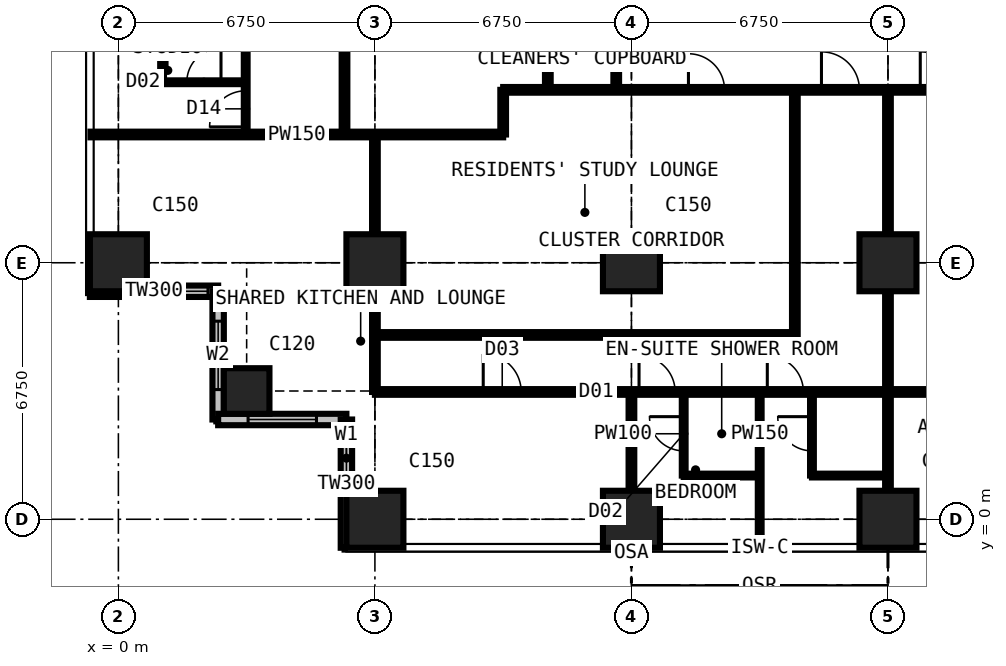
"""IFC4 building model, lengths in metres.
Left out: names, types, materials, properties, quantities, classifications, styles, units other than length and angle.
Written with IfcOpenShell. Run it as: python <this file> out.ifc"""

import sys

from ifc_helpers import new_model, si_unit, direction, frame, frame_2d, origin, origin_2d, place, context, subcontext, project, spatial, rectangle, extrude, element, fill, save


model = new_model("IFC4")
c1 = context("Model", 3, precision=1e-05, world=origin(), true_north=direction((0.0, 1.0)))
c2 = subcontext(c1, "Body", "Model", "MODEL_VIEW")
j1 = project(units=[si_unit("LENGTHUNIT", "METRE"), si_unit("PLANEANGLEUNIT", "RADIAN")], contexts=[c1])
p1 = place(None, origin())
s1 = spatial("IfcSite", under=j1, at=p1, CompositionType="ELEMENT")
p2 = place(p1, origin())
s2 = spatial("IfcBuilding", under=s1, at=p2, CompositionType="ELEMENT")
p3 = place(p2, frame((0.0, 0.0, 167.4)))
s3 = spatial("IfcBuildingStorey", under=s2, at=p3, CompositionType="ELEMENT", Elevation=167.4)
p4 = place(p3, frame((0.0, 6.75, 0.0), z_axis=(0.0, 0.0, 1.0), x_axis=(1.0, 0.0, 0.0)))
e1 = element("IfcColumn", 1, at=p4, inside=s3, PredefinedType="COLUMN", context=c2, shape_type="SweptSolid", body=[
    extrude(rectangle(XDim=1.5, YDim=1.5, at=origin_2d()), origin(), (0.0, 0.0, 1.0), 3.6),
])
p5 = place(p3, frame((3.375, 3.375, 0.0), z_axis=(0.0, 0.0, 1.0), x_axis=(1.0, 0.0, 0.0)))
e2 = element("IfcColumn", 2, at=p5, inside=s3, PredefinedType="COLUMN", context=c2, shape_type="SweptSolid", body=[
    extrude(rectangle(XDim=1.2, YDim=1.2, at=origin_2d()), origin(), (0.0, 0.0, 1.0), 3.6),
])
for number, where, z_axis, x_axis in (
    (3, (6.75, 0.0, 0.0), (0.0, 0.0, 1.0), (1.0, 0.0, 0.0)),
    (4, (6.75, 6.75, 0.0), (0.0, 0.0, 1.0), (1.0, 0.0, 0.0)),
    (5, (13.5, 0.0, 0.0), (0.0, 0.0, 1.0), (1.0, 0.0, 0.0)),
    (6, (13.5, 6.75, 0.0), (0.0, 0.0, 1.0), (1.0, 0.0, 0.0)),
    (7, (20.25, 0.0, 0.0), (0.0, 0.0, 1.0), (1.0, 0.0, 0.0)),
    (8, (20.25, 6.75, 0.0), (0.0, 0.0, 1.0), (1.0, 0.0, 0.0)),
):
    element("IfcColumn", number, at=place(p3, frame(where, z_axis=z_axis, x_axis=x_axis)), inside=s3, PredefinedType="COLUMN", context=c2, shape_type="SweptSolid", body=[
        extrude(rectangle(XDim=1.5, YDim=1.5, at=origin_2d()), origin(), (0.0, 0.0, 1.0), 3.6),
    ])
p6 = place(p3, frame((-0.75, 6.0, 0.0), z_axis=(0.0, 0.0, 1.0), x_axis=(1.0, 0.0, 0.0)))
e9 = element("IfcWall", 9, at=p6, inside=s3, PredefinedType="SOLIDWALL", context=c2, shape_type="SweptSolid", body=[
    extrude(rectangle(XDim=3.375, YDim=0.3, at=frame_2d((1.688, 0.0))), origin(), (0.0, 0.0, 1.0), 3.375),
])
p7 = place(p6, frame((1.607, 0.0, 0.9)))
e10 = element("IfcOpeningElement", 10, at=p7, cuts=e9, PredefinedType="OPENING", context=c2, shape_type="SweptSolid", body=[
    extrude(rectangle(XDim=1.5, YDim=1.8, at=frame_2d((0.75, 0.9))), frame((0.0, 0.16, 0.0), z_axis=(0.0, -1.0, 0.0), x_axis=(1.0, 0.0, 0.0)), (0.0, 0.0, 1.0), 0.32),
])
p8 = place(p3, frame((2.625, 6.0, 0.0), z_axis=(0.0, 0.0, 1.0), x_axis=(0.0, -1.0, 0.0)))
e11 = element("IfcWall", 11, at=p8, inside=s3, PredefinedType="SOLIDWALL", context=c2, shape_type="SweptSolid", body=[
    extrude(rectangle(XDim=3.375, YDim=0.3, at=frame_2d((1.688, 0.0))), origin(), (0.0, 0.0, 1.0), 3.375),
])
p9 = place(p8, frame((0.788, 0.0, 0.6)))
e12 = element("IfcOpeningElement", 12, at=p9, cuts=e11, PredefinedType="OPENING", context=c2, shape_type="SweptSolid", body=[
    extrude(rectangle(XDim=1.8, YDim=2.1, at=frame_2d((0.9, 1.05))), frame((0.0, 0.16, 0.0), z_axis=(0.0, -1.0, 0.0), x_axis=(1.0, 0.0, 0.0)), (0.0, 0.0, 1.0), 0.32),
])
p10 = place(p3, frame((2.625, 2.625, 0.0), z_axis=(0.0, 0.0, 1.0), x_axis=(1.0, 0.0, 0.0)))
e13 = element("IfcWall", 13, at=p10, inside=s3, PredefinedType="SOLIDWALL", context=c2, shape_type="SweptSolid", body=[
    extrude(rectangle(XDim=3.375, YDim=0.3, at=frame_2d((1.688, 0.0))), origin(), (0.0, 0.0, 1.0), 3.375),
])
p11 = place(p10, frame((0.788, 0.0, 0.6)))
e14 = element("IfcOpeningElement", 14, at=p11, cuts=e13, PredefinedType="OPENING", context=c2, shape_type="SweptSolid", body=[
    extrude(rectangle(XDim=1.8, YDim=2.1, at=frame_2d((0.9, 1.05))), frame((0.0, 0.16, 0.0), z_axis=(0.0, -1.0, 0.0), x_axis=(1.0, 0.0, 0.0)), (0.0, 0.0, 1.0), 0.32),
])
p12 = place(p3, frame((6.0, 2.625, 0.0), z_axis=(0.0, 0.0, 1.0), x_axis=(0.0, -1.0, 0.0)))
e15 = element("IfcWall", 15, at=p12, inside=s3, PredefinedType="SOLIDWALL", context=c2, shape_type="SweptSolid", body=[
    extrude(rectangle(XDim=3.375, YDim=0.3, at=frame_2d((1.688, 0.0))), origin(), (0.0, 0.0, 1.0), 3.375),
])
p13 = place(p12, frame((0.268, 0.0, 0.9)))
e16 = element("IfcOpeningElement", 16, at=p13, cuts=e15, PredefinedType="OPENING", context=c2, shape_type="SweptSolid", body=[
    extrude(rectangle(XDim=1.5, YDim=1.8, at=frame_2d((0.75, 0.9))), frame((0.0, 0.16, 0.0), z_axis=(0.0, -1.0, 0.0), x_axis=(1.0, 0.0, 0.0)), (0.0, 0.0, 1.0), 0.32),
])
p14 = place(p3, frame((-0.734, 10.125, 0.0), z_axis=(0.0, 0.0, 1.0), x_axis=(1.0, 0.0, 0.0)))
e17 = element("IfcWall", 17, at=p14, inside=s3, PredefinedType="PARTITIONING", context=c2, shape_type="SweptSolid", body=[
    extrude(rectangle(XDim=10.859, YDim=0.15, at=frame_2d((5.429, 0.0))), origin(), (0.0, 0.0, 1.0), 3.375),
])
p15 = place(p3, frame((1.15, 11.5, 0.0), z_axis=(0.0, 0.0, 1.0), x_axis=(0.0, 1.0, 0.0)))
e18 = element("IfcWall", 18, at=p15, inside=s3, PredefinedType="PARTITIONING", context=c2, shape_type="SweptSolid", body=[
    extrude(rectangle(XDim=2.0, YDim=0.1, at=frame_2d((1.0, 0.0))), origin(), (0.0, 0.0, 1.0), 3.375),
])
p16 = place(p3, frame((1.15, 11.5, 0.0), z_axis=(0.0, 0.0, 1.0), x_axis=(1.0, 0.0, 0.0)))
e19 = element("IfcWall", 19, at=p16, inside=s3, PredefinedType="PARTITIONING", context=c2, shape_type="SweptSolid", body=[
    extrude(rectangle(XDim=2.2, YDim=0.1, at=frame_2d((1.1, 0.0))), origin(), (0.0, 0.0, 1.0), 3.375),
])
p17 = place(p16, frame((0.65, 0.0, 0.0)))
e20 = element("IfcOpeningElement", 20, at=p17, cuts=e19, PredefinedType="OPENING", context=c2, shape_type="SweptSolid", body=[
    extrude(rectangle(XDim=0.9, YDim=2.2, at=frame_2d((0.45, 1.1))), frame((0.0, 0.06, 0.0), z_axis=(0.0, -1.0, 0.0), x_axis=(1.0, 0.0, 0.0)), (0.0, 0.0, 1.0), 0.12),
])
p18 = place(p3, frame((3.35, 10.125, 0.0), z_axis=(0.0, 0.0, 1.0), x_axis=(0.0, 1.0, 0.0)))
e21 = element("IfcWall", 21, at=p18, inside=s3, PredefinedType="PARTITIONING", context=c2, shape_type="SweptSolid", body=[
    extrude(rectangle(XDim=16.875, YDim=0.1, at=frame_2d((8.438, 0.0))), origin(), (0.0, 0.0, 1.0), 3.375),
])
p19 = place(p18, frame((0.2, 0.0, 0.0)))
e22 = element("IfcOpeningElement", 22, at=p19, cuts=e21, PredefinedType="OPENING", context=c2, shape_type="SweptSolid", body=[
    extrude(rectangle(XDim=0.95, YDim=2.2, at=frame_2d((0.475, 1.1))), frame((0.0, 0.06, 0.0), z_axis=(0.0, -1.0, 0.0), x_axis=(1.0, 0.0, 0.0)), (0.0, 0.0, 1.0), 0.12),
])
p20 = place(p18, frame((3.575, 0.0, 0.0)))
e23 = element("IfcOpeningElement", 23, at=p20, cuts=e21, PredefinedType="OPENING", context=c2, shape_type="SweptSolid", body=[
    extrude(rectangle(XDim=0.95, YDim=2.2, at=frame_2d((0.475, 1.1))), frame((0.0, 0.06, 0.0), z_axis=(0.0, -1.0, 0.0), x_axis=(1.0, 0.0, 0.0)), (0.0, 0.0, 1.0), 0.12),
])
p21 = place(p18, frame((6.95, 0.0, 0.0)))
e24 = element("IfcOpeningElement", 24, at=p21, cuts=e21, PredefinedType="OPENING", context=c2, shape_type="SweptSolid", body=[
    extrude(rectangle(XDim=0.95, YDim=2.2, at=frame_2d((0.475, 1.1))), frame((0.0, 0.06, 0.0), z_axis=(0.0, -1.0, 0.0), x_axis=(1.0, 0.0, 0.0)), (0.0, 0.0, 1.0), 0.12),
])
p22 = place(p3, frame((5.95, 10.125, 0.0), z_axis=(0.0, 0.0, 1.0), x_axis=(0.0, 1.0, 0.0)))
e25 = element("IfcWall", 25, at=p22, inside=s3, PredefinedType="PARTITIONING", context=c2, shape_type="SweptSolid", body=[
    extrude(rectangle(XDim=2.65, YDim=0.15, at=frame_2d((1.325, 0.0))), origin(), (0.0, 0.0, 1.0), 3.375),
])
p23 = place(p3, frame((6.75, 3.35, 0.0), z_axis=(0.0, 0.0, 1.0), x_axis=(0.0, 1.0, 0.0)))
e26 = element("IfcWall", 26, at=p23, inside=s3, PredefinedType="PARTITIONING", context=c2, shape_type="SweptSolid", body=[
    extrude(rectangle(XDim=6.775, YDim=0.15, at=frame_2d((3.387, 0.0))), origin(), (0.0, 0.0, 1.0), 2.877),
])
p24 = place(p3, frame((6.75, 3.35, 0.0), z_axis=(0.0, 0.0, 1.0), x_axis=(1.0, 0.0, 0.0)))
e27 = element("IfcWall", 27, at=p24, inside=s3, PredefinedType="PARTITIONING", context=c2, shape_type="SweptSolid", body=[
    extrude(rectangle(XDim=20.25, YDim=0.15, at=frame_2d((10.125, 0.0))), origin(), (0.0, 0.0, 1.0), 3.375),
])
p25 = place(p24, frame((2.85, 0.0, 0.0)))
e28 = element("IfcOpeningElement", 28, at=p25, cuts=e27, PredefinedType="OPENING", context=c2, shape_type="SweptSolid", body=[
    extrude(rectangle(XDim=1.0, YDim=2.2, at=frame_2d((0.5, 1.1))), frame((0.0, 0.085, 0.0), z_axis=(0.0, -1.0, 0.0), x_axis=(1.0, 0.0, 0.0)), (0.0, 0.0, 1.0), 0.17),
])
p26 = place(p24, frame((6.95, 0.0, 0.0)))
e29 = element("IfcOpeningElement", 29, at=p26, cuts=e27, PredefinedType="OPENING", context=c2, shape_type="SweptSolid", body=[
    extrude(rectangle(XDim=0.95, YDim=2.2, at=frame_2d((0.475, 1.1))), frame((0.0, 0.085, 0.0), z_axis=(0.0, -1.0, 0.0), x_axis=(1.0, 0.0, 0.0)), (0.0, 0.0, 1.0), 0.17),
])
p27 = place(p24, frame((10.325, 0.0, 0.0)))
e30 = element("IfcOpeningElement", 30, at=p27, cuts=e27, PredefinedType="OPENING", context=c2, shape_type="SweptSolid", body=[
    extrude(rectangle(XDim=0.95, YDim=2.2, at=frame_2d((0.475, 1.1))), frame((0.0, 0.085, 0.0), z_axis=(0.0, -1.0, 0.0), x_axis=(1.0, 0.0, 0.0)), (0.0, 0.0, 1.0), 0.17),
])
p28 = place(p24, frame((15.1, 0.0, 0.0)))
e31 = element("IfcOpeningElement", 31, at=p28, cuts=e27, PredefinedType="OPENING", context=c2, shape_type="SweptSolid", body=[
    extrude(rectangle(XDim=0.95, YDim=2.2, at=frame_2d((0.475, 1.1))), frame((0.0, 0.085, 0.0), z_axis=(0.0, -1.0, 0.0), x_axis=(1.0, 0.0, 0.0)), (0.0, 0.0, 1.0), 0.17),
])
p29 = place(p3, frame((6.75, 4.85, 0.0), z_axis=(0.0, 0.0, 1.0), x_axis=(1.0, 0.0, 0.0)))
e32 = element("IfcWall", 32, at=p29, inside=s3, PredefinedType="PARTITIONING", context=c2, shape_type="SweptSolid", body=[
    extrude(rectangle(XDim=11.05, YDim=0.15, at=frame_2d((5.525, 0.0))), origin(), (0.0, 0.0, 1.0), 3.375),
])
p30 = place(p3, frame((10.125, 10.125, 0.0), z_axis=(0.0, 0.0, 1.0), x_axis=(0.0, 1.0, 0.0)))
e33 = element("IfcWall", 33, at=p30, inside=s3, PredefinedType="PARTITIONING", context=c2, shape_type="SweptSolid", body=[
    extrude(rectangle(XDim=1.175, YDim=0.15, at=frame_2d((0.587, 0.0))), origin(), (0.0, 0.0, 1.0), 3.375),
])
p31 = place(p3, frame((10.125, 11.3, 0.0), z_axis=(0.0, 0.0, 1.0), x_axis=(1.0, 0.0, 0.0)))
e34 = element("IfcWall", 34, at=p31, inside=s3, PredefinedType="PARTITIONING", context=c2, shape_type="SweptSolid", body=[
    extrude(rectangle(XDim=20.25, YDim=0.15, at=frame_2d((10.125, 0.0))), origin(), (0.0, 0.0, 1.0), 3.375),
])
p32 = place(p31, frame((8.375, 0.0, 0.0)))
e35 = element("IfcOpeningElement", 35, at=p32, cuts=e34, PredefinedType="OPENING", context=c2, shape_type="SweptSolid", body=[
    extrude(rectangle(XDim=1.0, YDim=2.2, at=frame_2d((0.5, 1.1))), frame((0.0, 0.085, 0.0), z_axis=(0.0, -1.0, 0.0), x_axis=(1.0, 0.0, 0.0)), (0.0, 0.0, 1.0), 0.17),
])
p33 = place(p31, frame((10.975, 0.0, 0.0)))
e36 = element("IfcOpeningElement", 36, at=p33, cuts=e34, PredefinedType="OPENING", context=c2, shape_type="SweptSolid", body=[
    extrude(rectangle(XDim=1.0, YDim=2.2, at=frame_2d((0.5, 1.1))), frame((0.0, 0.085, 0.0), z_axis=(0.0, -1.0, 0.0), x_axis=(1.0, 0.0, 0.0)), (0.0, 0.0, 1.0), 0.17),
])
p34 = place(p31, frame((4.875, 0.0, 0.0)))
e37 = element("IfcOpeningElement", 37, at=p34, cuts=e34, PredefinedType="OPENING", context=c2, shape_type="SweptSolid", body=[
    extrude(rectangle(XDim=0.95, YDim=2.2, at=frame_2d((0.475, 1.1))), frame((0.0, 0.085, 0.0), z_axis=(0.0, -1.0, 0.0), x_axis=(1.0, 0.0, 0.0)), (0.0, 0.0, 1.0), 0.17),
])
p35 = place(p3, frame((11.3, 11.3, 0.0), z_axis=(0.0, 0.0, 1.0), x_axis=(0.0, 1.0, 0.0)))
e38 = element("IfcWall", 38, at=p35, inside=s3, PredefinedType="PARTITIONING", context=c2, shape_type="SweptSolid", body=[
    extrude(rectangle(XDim=19.3, YDim=0.15, at=frame_2d((9.65, 0.0))), origin(), (0.0, 0.0, 1.0), 3.375),
])
p36 = place(p35, frame((18.1, 0.0, 0.0)))
e39 = element("IfcOpeningElement", 39, at=p36, cuts=e38, PredefinedType="OPENING", context=c2, shape_type="SweptSolid", body=[
    extrude(rectangle(XDim=1.0, YDim=2.2, at=frame_2d((0.5, 1.1))), frame((0.0, 0.085, 0.0), z_axis=(0.0, -1.0, 0.0), x_axis=(1.0, 0.0, 0.0)), (0.0, 0.0, 1.0), 0.17),
])
p37 = place(p35, frame((10.137, 0.0, 0.0)))
e40 = element("IfcOpeningElement", 40, at=p37, cuts=e38, PredefinedType="OPENING", context=c2, shape_type="SweptSolid", body=[
    extrude(rectangle(XDim=1.0, YDim=2.2, at=frame_2d((0.5, 1.1))), frame((0.0, 0.085, 0.0), z_axis=(0.0, -1.0, 0.0), x_axis=(1.0, 0.0, 0.0)), (0.0, 0.0, 1.0), 0.17),
])
p38 = place(p3, frame((13.1, 11.3, 0.0), z_axis=(0.0, 0.0, 1.0), x_axis=(0.0, 1.0, 0.0)))
e41 = element("IfcWall", 41, at=p38, inside=s3, PredefinedType="PARTITIONING", context=c2, shape_type="SweptSolid", body=[
    extrude(rectangle(XDim=1.6, YDim=0.15, at=frame_2d((0.8, 0.0))), origin(), (0.0, 0.0, 1.0), 3.375),
])
p39 = place(p3, frame((13.5, -0.734, 0.0), z_axis=(0.0, 0.0, 1.0), x_axis=(0.0, 1.0, 0.0)))
e42 = element("IfcWall", 42, at=p39, inside=s3, PredefinedType="PARTITIONING", context=c2, shape_type="SweptSolid", body=[
    extrude(rectangle(XDim=4.084, YDim=0.15, at=frame_2d((2.042, 0.0))), origin(), (0.0, 0.0, 1.0), 2.61),
])
p40 = place(p3, frame((14.875, 1.15, 0.0), z_axis=(0.0, 0.0, 1.0), x_axis=(0.0, 1.0, 0.0)))
e43 = element("IfcWall", 43, at=p40, inside=s3, PredefinedType="PARTITIONING", context=c2, shape_type="SweptSolid", body=[
    extrude(rectangle(XDim=2.2, YDim=0.1, at=frame_2d((1.1, 0.0))), origin(), (0.0, 0.0, 1.0), 3.375),
])
p41 = place(p40, frame((0.65, 0.0, 0.0)))
e44 = element("IfcOpeningElement", 44, at=p41, cuts=e43, PredefinedType="OPENING", context=c2, shape_type="SweptSolid", body=[
    extrude(rectangle(XDim=0.9, YDim=2.2, at=frame_2d((0.45, 1.1))), frame((0.0, 0.06, 0.0), z_axis=(0.0, -1.0, 0.0), x_axis=(1.0, 0.0, 0.0)), (0.0, 0.0, 1.0), 0.12),
])
p42 = place(p3, frame((14.875, 1.15, 0.0), z_axis=(0.0, 0.0, 1.0), x_axis=(1.0, 0.0, 0.0)))
e45 = element("IfcWall", 45, at=p42, inside=s3, PredefinedType="PARTITIONING", context=c2, shape_type="SweptSolid", body=[
    extrude(rectangle(XDim=2.0, YDim=0.1, at=frame_2d((1.0, 0.0))), origin(), (0.0, 0.0, 1.0), 3.375),
])
p43 = place(p3, frame((16.875, -0.734, 0.0), z_axis=(0.0, 0.0, 1.0), x_axis=(0.0, 1.0, 0.0)))
e46 = element("IfcWall", 46, at=p43, inside=s3, PredefinedType="PARTITIONING", context=c2, shape_type="SweptSolid", body=[
    extrude(rectangle(XDim=4.084, YDim=0.1, at=frame_2d((2.042, 0.0))), origin(), (0.0, 0.0, 1.0), 3.375),
])
p44 = place(p3, frame((17.8, 4.85, 0.0), z_axis=(0.0, 0.0, 1.0), x_axis=(0.0, 1.0, 0.0)))
e47 = element("IfcWall", 47, at=p44, inside=s3, PredefinedType="PARTITIONING", context=c2, shape_type="SweptSolid", body=[
    extrude(rectangle(XDim=6.45, YDim=0.15, at=frame_2d((3.225, 0.0))), origin(), (0.0, 0.0, 1.0), 3.375),
])
p45 = place(p3, frame((18.25, 1.15, 0.0), z_axis=(0.0, 0.0, 1.0), x_axis=(0.0, 1.0, 0.0)))
e48 = element("IfcWall", 48, at=p45, inside=s3, PredefinedType="PARTITIONING", context=c2, shape_type="SweptSolid", body=[
    extrude(rectangle(XDim=2.2, YDim=0.1, at=frame_2d((1.1, 0.0))), origin(), (0.0, 0.0, 1.0), 3.375),
])
p46 = place(p45, frame((0.65, 0.0, 0.0)))
e49 = element("IfcOpeningElement", 49, at=p46, cuts=e48, PredefinedType="OPENING", context=c2, shape_type="SweptSolid", body=[
    extrude(rectangle(XDim=0.9, YDim=2.2, at=frame_2d((0.45, 1.1))), frame((0.0, 0.06, 0.0), z_axis=(0.0, -1.0, 0.0), x_axis=(1.0, 0.0, 0.0)), (0.0, 0.0, 1.0), 0.12),
])
p47 = place(p3, frame((18.25, 1.15, 0.0), z_axis=(0.0, 0.0, 1.0), x_axis=(1.0, 0.0, 0.0)))
e50 = element("IfcWall", 50, at=p47, inside=s3, PredefinedType="PARTITIONING", context=c2, shape_type="SweptSolid", body=[
    extrude(rectangle(XDim=2.0, YDim=0.1, at=frame_2d((1.0, 0.0))), origin(), (0.0, 0.0, 1.0), 3.375),
])
p48 = place(p3, frame((20.25, -0.734, 0.0), z_axis=(0.0, 0.0, 1.0), x_axis=(0.0, 1.0, 0.0)))
e51 = element("IfcWall", 51, at=p48, inside=s3, PredefinedType="PARTITIONING", context=c2, shape_type="SweptSolid", body=[
    extrude(rectangle(XDim=12.034, YDim=0.15, at=frame_2d((6.017, 0.0))), origin(), (0.0, 0.0, 1.0), 2.61),
])
p49 = place(p7, origin())
e52 = element("IfcWindow", 52, at=p49, inside=s3, PartitioningType="SINGLE_PANEL", PredefinedType="WINDOW", context=c2, shape_type="SweptSolid", body=[
    extrude(rectangle(XDim=1.5, YDim=1.8, at=frame_2d((0.75, 0.9))), frame((0.0, 0.03, 0.0), z_axis=(0.0, -1.0, 0.0), x_axis=(1.0, 0.0, 0.0)), (0.0, 0.0, 1.0), 0.06),
])
fill(e10, e52)
p50 = place(p9, origin())
e53 = element("IfcWindow", 53, at=p50, inside=s3, PartitioningType="SINGLE_PANEL", PredefinedType="WINDOW", context=c2, shape_type="SweptSolid", body=[
    extrude(rectangle(XDim=1.8, YDim=2.1, at=frame_2d((0.9, 1.05))), frame((0.0, 0.03, 0.0), z_axis=(0.0, -1.0, 0.0), x_axis=(1.0, 0.0, 0.0)), (0.0, 0.0, 1.0), 0.06),
])
fill(e12, e53)
p51 = place(p11, origin())
e54 = element("IfcWindow", 54, at=p51, inside=s3, PartitioningType="SINGLE_PANEL", PredefinedType="WINDOW", context=c2, shape_type="SweptSolid", body=[
    extrude(rectangle(XDim=1.8, YDim=2.1, at=frame_2d((0.9, 1.05))), frame((0.0, 0.03, 0.0), z_axis=(0.0, -1.0, 0.0), x_axis=(1.0, 0.0, 0.0)), (0.0, 0.0, 1.0), 0.06),
])
fill(e14, e54)
p52 = place(p13, origin())
e55 = element("IfcWindow", 55, at=p52, inside=s3, PartitioningType="SINGLE_PANEL", PredefinedType="WINDOW", context=c2, shape_type="SweptSolid", body=[
    extrude(rectangle(XDim=1.5, YDim=1.8, at=frame_2d((0.75, 0.9))), frame((0.0, 0.03, 0.0), z_axis=(0.0, -1.0, 0.0), x_axis=(1.0, 0.0, 0.0)), (0.0, 0.0, 1.0), 0.06),
])
fill(e16, e55)
p53 = place(p25, origin())
e56 = element("IfcDoor", 56, at=p53, inside=s3, OperationType="SINGLE_SWING_LEFT", PredefinedType="DOOR", context=c2, shape_type="SweptSolid", body=[
    extrude(rectangle(XDim=1.0, YDim=2.2, at=frame_2d((0.5, 1.1))), frame((0.0, 0.025, 0.0), z_axis=(0.0, -1.0, 0.0), x_axis=(1.0, 0.0, 0.0)), (0.0, 0.0, 1.0), 0.05),
])
fill(e28, e56)
p54 = place(p26, origin())
e57 = element("IfcDoor", 57, at=p54, inside=s3, OperationType="SINGLE_SWING_LEFT", PredefinedType="DOOR", context=c2, shape_type="SweptSolid", body=[
    extrude(rectangle(XDim=0.95, YDim=2.2, at=frame_2d((0.475, 1.1))), frame((0.0, 0.025, 0.0), z_axis=(0.0, -1.0, 0.0), x_axis=(1.0, 0.0, 0.0)), (0.0, 0.0, 1.0), 0.05),
])
fill(e29, e57)
p55 = place(p41, origin())
e58 = element("IfcDoor", 58, at=p55, inside=s3, OperationType="SINGLE_SWING_RIGHT", PredefinedType="DOOR", context=c2, shape_type="SweptSolid", body=[
    extrude(rectangle(XDim=0.9, YDim=2.2, at=frame_2d((0.45, 1.1))), frame((0.0, 0.025, 0.0), z_axis=(0.0, -1.0, 0.0), x_axis=(1.0, 0.0, 0.0)), (0.0, 0.0, 1.0), 0.05),
])
fill(e44, e58)
p56 = place(p27, origin())
e59 = element("IfcDoor", 59, at=p56, inside=s3, OperationType="SINGLE_SWING_LEFT", PredefinedType="DOOR", context=c2, shape_type="SweptSolid", body=[
    extrude(rectangle(XDim=0.95, YDim=2.2, at=frame_2d((0.475, 1.1))), frame((0.0, 0.025, 0.0), z_axis=(0.0, -1.0, 0.0), x_axis=(1.0, 0.0, 0.0)), (0.0, 0.0, 1.0), 0.05),
])
fill(e30, e59)
p57 = place(p46, origin())
e60 = element("IfcDoor", 60, at=p57, inside=s3, OperationType="SINGLE_SWING_RIGHT", PredefinedType="DOOR", context=c2, shape_type="SweptSolid", body=[
    extrude(rectangle(XDim=0.9, YDim=2.2, at=frame_2d((0.45, 1.1))), frame((0.0, 0.025, 0.0), z_axis=(0.0, -1.0, 0.0), x_axis=(1.0, 0.0, 0.0)), (0.0, 0.0, 1.0), 0.05),
])
fill(e49, e60)
p58 = place(p32, origin())
e61 = element("IfcDoor", 61, at=p58, inside=s3, OperationType="SINGLE_SWING_LEFT", PredefinedType="DOOR", context=c2, shape_type="SweptSolid", body=[
    extrude(rectangle(XDim=1.0, YDim=2.2, at=frame_2d((0.5, 1.1))), frame((0.0, 0.025, 0.0), z_axis=(0.0, -1.0, 0.0), x_axis=(1.0, 0.0, 0.0)), (0.0, 0.0, 1.0), 0.05),
])
fill(e35, e61)
p59 = place(p33, origin())
e62 = element("IfcDoor", 62, at=p59, inside=s3, OperationType="SINGLE_SWING_LEFT", PredefinedType="DOOR", context=c2, shape_type="SweptSolid", body=[
    extrude(rectangle(XDim=1.0, YDim=2.2, at=frame_2d((0.5, 1.1))), frame((0.0, 0.025, 0.0), z_axis=(0.0, -1.0, 0.0), x_axis=(1.0, 0.0, 0.0)), (0.0, 0.0, 1.0), 0.05),
])
fill(e36, e62)
p60 = place(p34, origin())
e63 = element("IfcDoor", 63, at=p60, inside=s3, OperationType="SINGLE_SWING_LEFT", PredefinedType="DOOR", context=c2, shape_type="SweptSolid", body=[
    extrude(rectangle(XDim=0.95, YDim=2.2, at=frame_2d((0.475, 1.1))), frame((0.0, 0.025, 0.0), z_axis=(0.0, -1.0, 0.0), x_axis=(1.0, 0.0, 0.0)), (0.0, 0.0, 1.0), 0.05),
])
fill(e37, e63)
p61 = place(p19, origin())
e64 = element("IfcDoor", 64, at=p61, inside=s3, OperationType="SINGLE_SWING_LEFT", PredefinedType="DOOR", context=c2, shape_type="SweptSolid", body=[
    extrude(rectangle(XDim=0.95, YDim=2.2, at=frame_2d((0.475, 1.1))), frame((0.0, 0.025, 0.0), z_axis=(0.0, -1.0, 0.0), x_axis=(1.0, 0.0, 0.0)), (0.0, 0.0, 1.0), 0.05),
])
fill(e22, e64)
p62 = place(p17, origin())
e65 = element("IfcDoor", 65, at=p62, inside=s3, OperationType="SINGLE_SWING_RIGHT", PredefinedType="DOOR", context=c2, shape_type="SweptSolid", body=[
    extrude(rectangle(XDim=0.9, YDim=2.2, at=frame_2d((0.45, 1.1))), frame((0.0, 0.025, 0.0), z_axis=(0.0, -1.0, 0.0), x_axis=(1.0, 0.0, 0.0)), (0.0, 0.0, 1.0), 0.05),
])
fill(e20, e65)
save(model, sys.argv[1])
